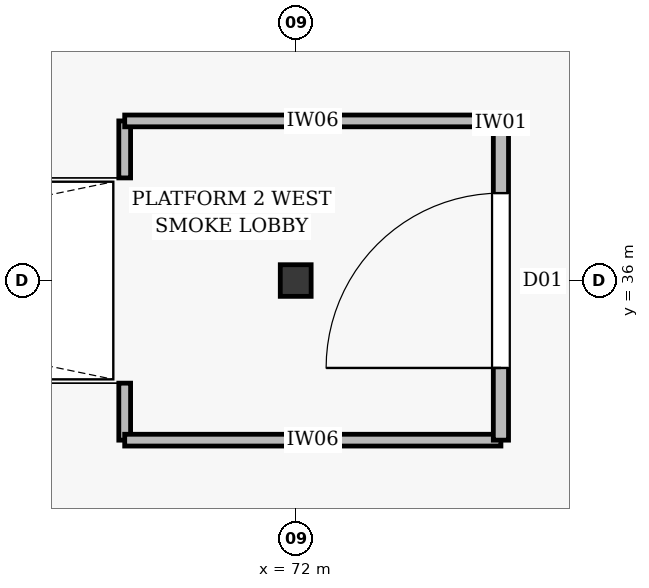
"""IFC4 building model, lengths in metres.
Left out: names, types, materials, properties, quantities, classifications, styles, units other than length and angle.
Written with IfcOpenShell. Run it as: python <this file> out.ifc"""

import sys

from ifc_helpers import new_model, si_unit, direction, frame, frame_2d, origin, origin_2d, place, context, subcontext, project, spatial, rectangle, i_section, extrude, element, fill, save


model = new_model("IFC4")
c1 = context("Model", 3, precision=1e-05, world=origin(), true_north=direction((0.0, 1.0)))
c2 = subcontext(c1, "Body", "Model", "MODEL_VIEW")
j1 = project(units=[si_unit("LENGTHUNIT", "METRE"), si_unit("PLANEANGLEUNIT", "RADIAN")], contexts=[c1])
p1 = place(None, origin())
s1 = spatial("IfcSite", under=j1, at=p1, CompositionType="ELEMENT")
p2 = place(p1, origin())
s2 = spatial("IfcBuilding", under=s1, at=p2, CompositionType="ELEMENT")
p3 = place(p2, frame((0.0, 0.0, 6.6)))
s3 = spatial("IfcBuildingStorey", under=s2, at=p3, CompositionType="ELEMENT", Elevation=6.6)
p4 = place(p3, frame((72.0, 36.0, 0.0), z_axis=(0.0, 0.0, 1.0), x_axis=(1.0, 0.0, 0.0)))
e1 = element("IfcColumn", 1, at=p4, inside=s3, PredefinedType="COLUMN", context=c2, shape_type="SweptSolid", body=[
    extrude(i_section(OverallWidth=0.406, OverallDepth=0.416, WebThickness=0.023, FlangeThickness=0.035, at=origin_2d()), origin(), (0.0, 0.0, 1.0), 6.0),
])
for number, where, z_axis, x_axis in (
    (2, (69.75, 33.9, 0.0), (0.0, 0.0, 1.0), (0.0, 1.0, 0.0)),
    (3, (69.75, 37.35, 0.0), (0.0, 0.0, 1.0), (0.0, 1.0, 0.0)),
):
    element("IfcWall", number, at=place(p3, frame(where, z_axis=z_axis, x_axis=x_axis)), inside=s3, PredefinedType="PARTITIONING", context=c2, shape_type="SweptSolid", body=[
        extrude(rectangle(XDim=0.75, YDim=0.155, at=frame_2d((0.375, 0.0))), origin(), (0.0, 0.0, 1.0), 2.62),
    ])
for number, where, z_axis, x_axis in (
    (4, (69.75, 33.9, 0.0), (0.0, 0.0, 1.0), (1.0, 0.0, 0.0)),
    (5, (69.75, 38.1, 0.0), (0.0, 0.0, 1.0), (1.0, 0.0, 0.0)),
):
    element("IfcWall", number, at=place(p3, frame(where, z_axis=z_axis, x_axis=x_axis)), inside=s3, PredefinedType="PARTITIONING", context=c2, shape_type="SweptSolid", body=[
        extrude(rectangle(XDim=4.95, YDim=0.155, at=frame_2d((2.475, 0.0))), origin(), (0.0, 0.0, 1.0), 2.62),
    ])
p5 = place(p3, frame((74.7, 33.9, 0.0), z_axis=(0.0, 0.0, 1.0), x_axis=(0.0, 1.0, 0.0)))
e6 = element("IfcWall", 6, at=p5, inside=s3, PredefinedType="PARTITIONING", context=c2, shape_type="SweptSolid", body=[
    extrude(rectangle(XDim=4.2, YDim=0.2, at=frame_2d((2.1, 0.0))), origin(), (0.0, 0.0, 1.0), 2.62),
])
p6 = place(p5, frame((0.95, 0.0, 0.005)))
e7 = element("IfcOpeningElement", 7, at=p6, cuts=e6, PredefinedType="OPENING", context=c2, shape_type="SweptSolid", body=[
    extrude(rectangle(XDim=2.3, YDim=2.4, at=frame_2d((1.15, 1.2))), frame((0.0, 0.112, 0.0), z_axis=(0.0, -1.0, 0.0), x_axis=(1.0, 0.0, 0.0)), (0.0, 0.0, 1.0), 0.224),
])
p7 = place(p6, origin())
e8 = element("IfcDoor", 8, at=p7, inside=s3, OperationType="DOUBLE_DOOR_SINGLE_SWING", PredefinedType="DOOR", context=c2, shape_type="SweptSolid", body=[
    extrude(rectangle(XDim=2.3, YDim=2.4, at=frame_2d((1.15, 1.2))), frame((0.0, 0.025, 0.0), z_axis=(0.0, -1.0, 0.0), x_axis=(1.0, 0.0, 0.0)), (0.0, 0.0, 1.0), 0.05),
])
fill(e7, e8)
save(model, sys.argv[1])
